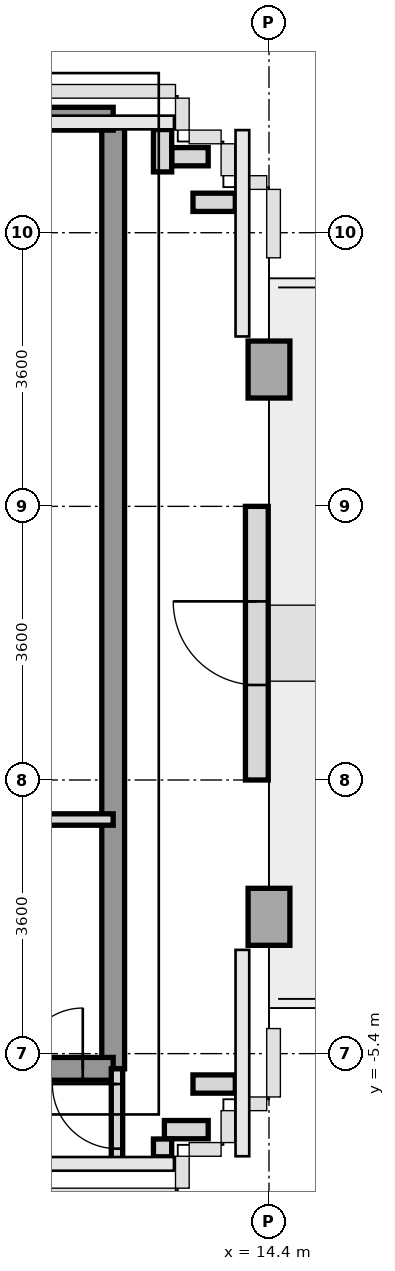
"""IFC4 building model, lengths in metres.
Left out: names, types, materials, properties, quantities, classifications, styles, units other than length and angle.
Written with IfcOpenShell. Run it as: python <this file> out.ifc"""

import sys

from ifc_helpers import new_model, si_unit, direction, frame, frame_2d, origin, origin_2d, place, context, subcontext, project, spatial, rectangle, extrude, source, transform, mapped, element, fill, save


model = new_model("IFC4")
c1 = context("Model", 3, precision=1e-05, world=origin(), true_north=direction((0.0, 1.0)))
c2 = subcontext(c1, "Body", "Model", "MODEL_VIEW")
j1 = project(units=[si_unit("LENGTHUNIT", "METRE"), si_unit("PLANEANGLEUNIT", "RADIAN")], contexts=[c1])
p1 = place(None, origin())
s1 = spatial("IfcSite", under=j1, at=p1, CompositionType="ELEMENT")
p2 = place(p1, origin())
s2 = spatial("IfcBuilding", under=s1, at=p2, CompositionType="ELEMENT")
p3 = place(p2, frame((0.0, 0.0, 258.8)))
s3 = spatial("IfcBuildingStorey", under=s2, at=p3, CompositionType="ELEMENT", Elevation=258.8)
m1 = source(origin(), c2, "Body", "SweptSolid", [
    extrude(rectangle(XDim=0.55, YDim=0.75, at=origin_2d()), origin(), (0.0, 0.0, 1.0), 3.01),
])
for number, where, z_axis, x_axis in (
    (1, (14.4, -3.6, 0.0), (0.0, 0.0, 1.0), (1.0, 0.0, 0.0)),
    (2, (14.4, 3.6, 0.0), (0.0, 0.0, 1.0), (1.0, 0.0, 0.0)),
):
    element("IfcColumn", number, at=place(p3, frame(where, z_axis=z_axis, x_axis=x_axis)), inside=s3, PredefinedType="COLUMN", context=c2, shape_type="MappedRepresentation", body=[
        mapped(m1, transform((0.0, 0.0, 0.0), x_axis=(1.0, 0.0, 0.0), y_axis=(0.0, 1.0, 0.0), z_axis=(0.0, 0.0, 1.0), scale=1.0)),
    ])
p4 = place(p3, frame((14.24, -1.8, 0.0), z_axis=(0.0, 0.0, 1.0), x_axis=(0.0, 1.0, 0.0)))
e3 = element("IfcWall", 3, at=p4, inside=s3, PredefinedType="SOLIDWALL", context=c2, shape_type="SweptSolid", body=[
    extrude(rectangle(XDim=3.6, YDim=0.3, at=frame_2d((1.8, 0.0))), origin(), (0.0, 0.0, 1.0), 2.36),
])
p5 = place(p4, frame((1.25, 0.0, 0.0)))
e4 = element("IfcOpeningElement", 4, at=p5, cuts=e3, PredefinedType="OPENING", context=c2, shape_type="SweptSolid", body=[
    extrude(rectangle(XDim=1.1, YDim=2.3, at=frame_2d((0.55, 1.15))), frame((0.0, 0.16, 0.0), z_axis=(0.0, -1.0, 0.0), x_axis=(1.0, 0.0, 0.0)), (0.0, 0.0, 1.0), 0.32),
])
p6 = place(p3, frame((13.957, -5.8, 0.0), z_axis=(0.0, 0.0, 1.0), x_axis=(-1.0, 0.0, 0.0)))
e5 = element("IfcWall", 5, at=p6, inside=s3, PredefinedType="PARAPET", context=c2, shape_type="SweptSolid", body=[
    extrude(rectangle(XDim=0.557, YDim=0.24, at=frame_2d((0.279, 0.0))), origin(), (0.0, 0.0, 1.0), 1.15),
])
p7 = place(p3, frame((13.6, -6.4, 0.0), z_axis=(0.0, 0.0, 1.0), x_axis=(-1.0, 0.0, 0.0)))
e6 = element("IfcWall", 6, at=p7, inside=s3, PredefinedType="PARAPET", context=c2, shape_type="SweptSolid", body=[
    extrude(rectangle(XDim=0.576, YDim=0.24, at=frame_2d((0.288, 0.0))), origin(), (0.0, 0.0, 1.0), 1.15),
])
p8 = place(p3, frame((13.0, -6.523, 0.0), z_axis=(0.0, 0.0, 1.0), x_axis=(0.0, -1.0, 0.0)))
e7 = element("IfcWall", 7, at=p8, inside=s3, PredefinedType="PARAPET", context=c2, shape_type="SweptSolid", body=[
    extrude(rectangle(XDim=0.234, YDim=0.24, at=frame_2d((0.117, 0.0))), origin(), (0.0, 0.0, 1.0), 1.15),
])
p9 = place(p3, frame((13.0, 6.757, 0.0), z_axis=(0.0, 0.0, 1.0), x_axis=(0.0, -1.0, 0.0)))
e8 = element("IfcWall", 8, at=p9, inside=s3, PredefinedType="PARAPET", context=c2, shape_type="SweptSolid", body=[
    extrude(rectangle(XDim=0.557, YDim=0.24, at=frame_2d((0.279, 0.0))), origin(), (0.0, 0.0, 1.0), 1.15),
])
p10 = place(p3, frame((13.123, 6.4, 0.0), z_axis=(0.0, 0.0, 1.0), x_axis=(1.0, 0.0, 0.0)))
e9 = element("IfcWall", 9, at=p10, inside=s3, PredefinedType="PARAPET", context=c2, shape_type="SweptSolid", body=[
    extrude(rectangle(XDim=0.477, YDim=0.24, at=frame_2d((0.239, 0.0))), origin(), (0.0, 0.0, 1.0), 1.15),
])
p11 = place(p3, frame((13.4, 5.8, 0.0), z_axis=(0.0, 0.0, 1.0), x_axis=(1.0, 0.0, 0.0)))
e10 = element("IfcWall", 10, at=p11, inside=s3, PredefinedType="PARAPET", context=c2, shape_type="SweptSolid", body=[
    extrude(rectangle(XDim=0.557, YDim=0.24, at=frame_2d((0.279, 0.0))), origin(), (0.0, 0.0, 1.0), 1.15),
])
p12 = place(p3, frame((12.35, -5.6, 0.0), z_axis=(0.0, 0.0, 1.0), x_axis=(0.0, 1.0, 0.0)))
e11 = element("IfcWall", 11, at=p12, inside=s3, PredefinedType="SHEAR", context=c2, shape_type="SweptSolid", body=[
    extrude(rectangle(XDim=12.5, YDim=0.3, at=frame_2d((6.25, 0.0))), origin(), (0.0, 0.0, 1.0), 3.01),
])
p13 = place(p3, frame((5.4, 6.9, 0.0), z_axis=(0.0, 0.0, 1.0), x_axis=(1.0, 0.0, 0.0)))
e12 = element("IfcWall", 12, at=p13, inside=s3, PredefinedType="SHEAR", context=c2, shape_type="SweptSolid", body=[
    extrude(rectangle(XDim=6.95, YDim=0.3, at=frame_2d((3.475, 0.0))), origin(), (0.0, 0.0, 1.0), 3.01),
])
p14 = place(p3, frame((5.4, -5.6, 0.0), z_axis=(0.0, 0.0, 1.0), x_axis=(1.0, 0.0, 0.0)))
e13 = element("IfcWall", 13, at=p14, inside=s3, PredefinedType="SHEAR", context=c2, shape_type="SweptSolid", body=[
    extrude(rectangle(XDim=6.95, YDim=0.3, at=frame_2d((3.475, 0.0))), origin(), (0.0, 0.0, 1.0), 3.01),
])
p15 = place(p14, frame((5.75, 0.0, 0.0)))
e14 = element("IfcOpeningElement", 14, at=p15, cuts=e13, PredefinedType="OPENING", context=c2, shape_type="SweptSolid", body=[
    extrude(rectangle(XDim=0.8, YDim=2.1, at=frame_2d((0.4, 1.05))), frame((0.0, 0.16, 0.0), z_axis=(0.0, -1.0, 0.0), x_axis=(1.0, 0.0, 0.0)), (0.0, 0.0, 1.0), 0.32),
])
p16 = place(p14, frame((1.2, 0.0, 0.0)))
e15 = element("IfcOpeningElement", 15, at=p16, cuts=e13, PredefinedType="OPENING", context=c2, shape_type="SweptSolid", body=[
    extrude(rectangle(XDim=0.85, YDim=2.1, at=frame_2d((0.425, 1.05))), frame((0.0, 0.16, 0.0), z_axis=(0.0, -1.0, 0.0), x_axis=(1.0, 0.0, 0.0)), (0.0, 0.0, 1.0), 0.32),
])
p17 = place(p14, frame((3.4, 0.0, 0.0)))
e16 = element("IfcOpeningElement", 16, at=p17, cuts=e13, PredefinedType="OPENING", context=c2, shape_type="SweptSolid", body=[
    extrude(rectangle(XDim=0.85, YDim=2.1, at=frame_2d((0.425, 1.05))), frame((0.0, 0.16, 0.0), z_axis=(0.0, -1.0, 0.0), x_axis=(1.0, 0.0, 0.0)), (0.0, 0.0, 1.0), 0.32),
])
p18 = place(p3, frame((10.92, -2.32, 0.0), z_axis=(0.0, 0.0, 1.0), x_axis=(1.0, 0.0, 0.0)))
e17 = element("IfcWall", 17, at=p18, inside=s3, PredefinedType="PARTITIONING", context=c2, shape_type="SweptSolid", body=[
    extrude(rectangle(XDim=1.43, YDim=0.15, at=frame_2d((0.715, 0.0))), origin(), (0.0, 0.0, 1.0), 3.01),
])
p19 = place(p3, frame((12.4, -6.85, 0.0), z_axis=(0.0, 0.0, 1.0), x_axis=(0.0, 1.0, 0.0)))
e18 = element("IfcWall", 18, at=p19, inside=s3, PredefinedType="PARTITIONING", context=c2, shape_type="SweptSolid", body=[
    extrude(rectangle(XDim=1.25, YDim=0.15, at=frame_2d((0.625, 0.0))), origin(), (0.0, 0.0, 1.0), 3.01),
])
p20 = place(p19, frame((0.2, 0.0, 0.0)))
e19 = element("IfcOpeningElement", 19, at=p20, cuts=e18, PredefinedType="OPENING", context=c2, shape_type="SweptSolid", body=[
    extrude(rectangle(XDim=0.85, YDim=2.1, at=frame_2d((0.425, 1.05))), frame((0.0, 0.085, 0.0), z_axis=(0.0, -1.0, 0.0), x_axis=(1.0, 0.0, 0.0)), (0.0, 0.0, 1.0), 0.17),
])
m2 = source(origin(), c2, "Body", "SweptSolid", [
    extrude(rectangle(XDim=1.1, YDim=2.3, at=frame_2d((0.55, 1.15))), frame((0.0, 0.025, 0.0), z_axis=(0.0, -1.0, 0.0), x_axis=(1.0, 0.0, 0.0)), (0.0, 0.0, 1.0), 0.05),
])
p21 = place(p5, frame((1.1, 0.0, 0.0), z_axis=(0.0, 0.0, 1.0), x_axis=(-1.0, 0.0, 0.0)))
e20 = element("IfcDoor", 20, at=p21, inside=s3, OperationType="SINGLE_SWING_RIGHT", PredefinedType="DOOR", context=c2, shape_type="MappedRepresentation", body=[
    mapped(m2, transform((0.0, 0.0, 0.0), x_axis=(1.0, 0.0, 0.0), y_axis=(0.0, 1.0, 0.0), z_axis=(0.0, 0.0, 1.0), scale=1.0)),
])
fill(e4, e20)
m3 = source(origin(), c2, "Body", "SweptSolid", [
    extrude(rectangle(XDim=0.8, YDim=2.1, at=frame_2d((0.4, 1.05))), frame((0.0, 0.025, 0.0), z_axis=(0.0, -1.0, 0.0), x_axis=(1.0, 0.0, 0.0)), (0.0, 0.0, 1.0), 0.05),
])
p22 = place(p15, origin())
e21 = element("IfcDoor", 21, at=p22, inside=s3, OperationType="SINGLE_SWING_RIGHT", PredefinedType="DOOR", context=c2, shape_type="MappedRepresentation", body=[
    mapped(m3, transform((0.0, 0.0, 0.0), x_axis=(1.0, 0.0, 0.0), y_axis=(0.0, 1.0, 0.0), z_axis=(0.0, 0.0, 1.0), scale=1.0)),
])
fill(e14, e21)
m4 = source(origin(), c2, "Body", "SweptSolid", [
    extrude(rectangle(XDim=0.85, YDim=2.1, at=frame_2d((0.425, 1.05))), frame((0.0, 0.025, 0.0), z_axis=(0.0, -1.0, 0.0), x_axis=(1.0, 0.0, 0.0)), (0.0, 0.0, 1.0), 0.05),
])
p23 = place(p20, origin())
e22 = element("IfcDoor", 22, at=p23, inside=s3, OperationType="SINGLE_SWING_RIGHT", PredefinedType="DOOR", context=c2, shape_type="MappedRepresentation", body=[
    mapped(m4, transform((0.0, 0.0, 0.0), x_axis=(1.0, 0.0, 0.0), y_axis=(0.0, 1.0, 0.0), z_axis=(0.0, 0.0, 1.0), scale=1.0)),
])
fill(e19, e22)
save(model, sys.argv[1])
